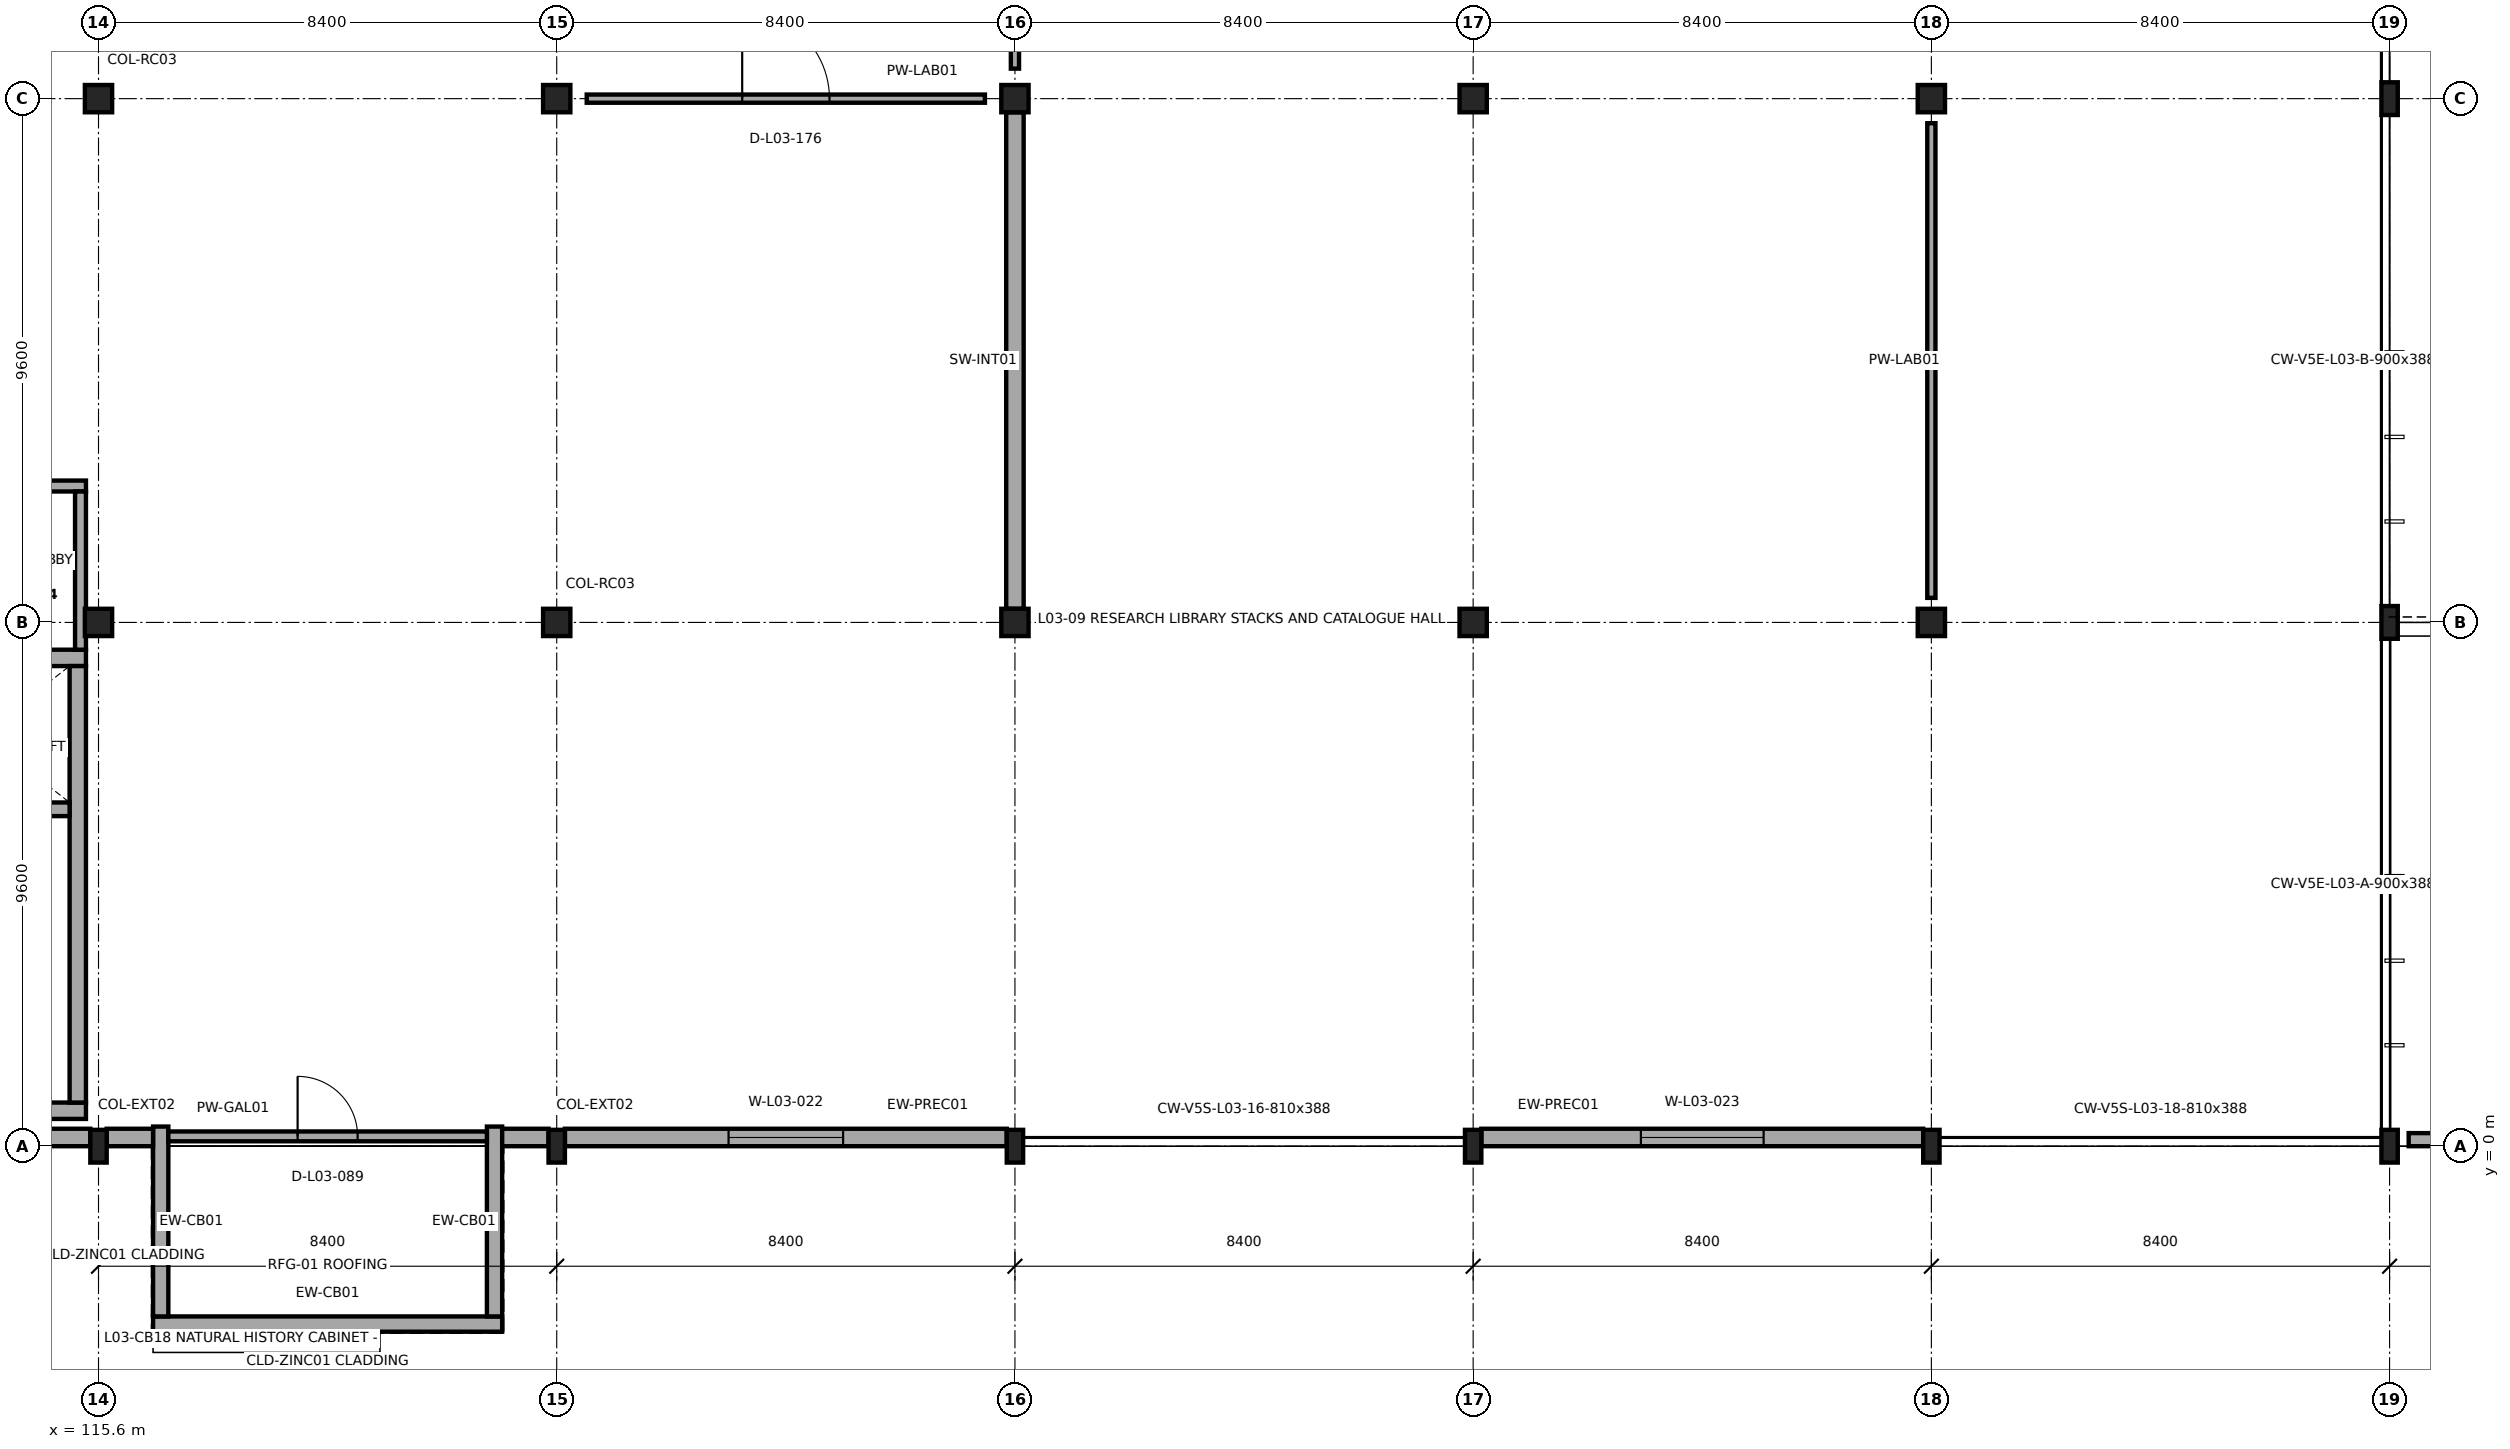
"""IFC4 building model, lengths in metres.
Left out: names, types, materials, properties, quantities, classifications, styles, units other than length and angle.
Written with IfcOpenShell. Run it as: python <this file> out.ifc"""

import sys

from ifc_helpers import new_model, si_unit, direction, frame, frame_2d, origin, origin_2d, place, context, subcontext, project, spatial, rectangle, i_section, extrude, element, fill, save


model = new_model("IFC4")
c1 = context("Model", 3, precision=1e-05, world=origin(), true_north=direction((0.0, 1.0)))
c2 = subcontext(c1, "Body", "Model", "MODEL_VIEW")
j1 = project(units=[si_unit("LENGTHUNIT", "METRE"), si_unit("PLANEANGLEUNIT", "RADIAN")], contexts=[c1])
p1 = place(None, origin())
s1 = spatial("IfcSite", under=j1, at=p1, CompositionType="ELEMENT")
p2 = place(p1, origin())
s2 = spatial("IfcBuilding", under=s1, at=p2, CompositionType="ELEMENT")
p3 = place(p2, frame((0.0, 0.0, 17.4)))
s3 = spatial("IfcBuildingStorey", under=s2, at=p3, CompositionType="ELEMENT", Elevation=17.4)
p4 = place(p3, frame((115.6, 0.0, 0.0), z_axis=(0.0, 0.0, 1.0), x_axis=(1.0, 0.0, 0.0)))
e1 = element("IfcColumn", 1, at=p4, inside=s3, PredefinedType="COLUMN", context=c2, shape_type="SweptSolid", body=[
    extrude(i_section(OverallWidth=0.3, OverallDepth=0.6, WebThickness=0.015, FlangeThickness=0.03, FilletRadius=0.027, at=origin_2d()), origin(), (0.0, 0.0, 1.0), 4.5),
])
for number, where, z_axis, x_axis in (
    (2, (115.6, 9.6, 0.0), (0.0, 0.0, 1.0), (1.0, 0.0, 0.0)),
    (3, (115.6, 19.2, 0.0), (0.0, 0.0, 1.0), (1.0, 0.0, 0.0)),
):
    element("IfcColumn", number, at=place(p3, frame(where, z_axis=z_axis, x_axis=x_axis)), inside=s3, PredefinedType="COLUMN", context=c2, shape_type="SweptSolid", body=[
        extrude(rectangle(XDim=0.5, YDim=0.5, at=origin_2d()), origin(), (0.0, 0.0, 1.0), 4.5),
    ])
p5 = place(p3, frame((124.0, 0.0, 0.0), z_axis=(0.0, 0.0, 1.0), x_axis=(1.0, 0.0, 0.0)))
e4 = element("IfcColumn", 4, at=p5, inside=s3, PredefinedType="COLUMN", context=c2, shape_type="SweptSolid", body=[
    extrude(i_section(OverallWidth=0.3, OverallDepth=0.6, WebThickness=0.015, FlangeThickness=0.03, FilletRadius=0.027, at=origin_2d()), origin(), (0.0, 0.0, 1.0), 4.5),
])
for number, where, z_axis, x_axis in (
    (5, (124.0, 9.6, 0.0), (0.0, 0.0, 1.0), (1.0, 0.0, 0.0)),
    (6, (124.0, 19.2, 0.0), (0.0, 0.0, 1.0), (1.0, 0.0, 0.0)),
):
    element("IfcColumn", number, at=place(p3, frame(where, z_axis=z_axis, x_axis=x_axis)), inside=s3, PredefinedType="COLUMN", context=c2, shape_type="SweptSolid", body=[
        extrude(rectangle(XDim=0.5, YDim=0.5, at=origin_2d()), origin(), (0.0, 0.0, 1.0), 4.5),
    ])
p6 = place(p3, frame((132.4, 0.0, 0.0), z_axis=(0.0, 0.0, 1.0), x_axis=(1.0, 0.0, 0.0)))
e7 = element("IfcColumn", 7, at=p6, inside=s3, PredefinedType="COLUMN", context=c2, shape_type="SweptSolid", body=[
    extrude(i_section(OverallWidth=0.3, OverallDepth=0.6, WebThickness=0.015, FlangeThickness=0.03, FilletRadius=0.027, at=origin_2d()), origin(), (0.0, 0.0, 1.0), 4.5),
])
for number, where, z_axis, x_axis in (
    (8, (132.4, 9.6, 0.0), (0.0, 0.0, 1.0), (1.0, 0.0, 0.0)),
    (9, (132.4, 19.2, 0.0), (0.0, 0.0, 1.0), (1.0, 0.0, 0.0)),
):
    element("IfcColumn", number, at=place(p3, frame(where, z_axis=z_axis, x_axis=x_axis)), inside=s3, PredefinedType="COLUMN", context=c2, shape_type="SweptSolid", body=[
        extrude(rectangle(XDim=0.5, YDim=0.5, at=origin_2d()), origin(), (0.0, 0.0, 1.0), 4.5),
    ])
p7 = place(p3, frame((140.8, 0.0, 0.0), z_axis=(0.0, 0.0, 1.0), x_axis=(1.0, 0.0, 0.0)))
e10 = element("IfcColumn", 10, at=p7, inside=s3, PredefinedType="COLUMN", context=c2, shape_type="SweptSolid", body=[
    extrude(i_section(OverallWidth=0.3, OverallDepth=0.6, WebThickness=0.015, FlangeThickness=0.03, FilletRadius=0.027, at=origin_2d()), origin(), (0.0, 0.0, 1.0), 4.5),
])
for number, where, z_axis, x_axis in (
    (11, (140.8, 9.6, 0.0), (0.0, 0.0, 1.0), (1.0, 0.0, 0.0)),
    (12, (140.8, 19.2, 0.0), (0.0, 0.0, 1.0), (1.0, 0.0, 0.0)),
):
    element("IfcColumn", number, at=place(p3, frame(where, z_axis=z_axis, x_axis=x_axis)), inside=s3, PredefinedType="COLUMN", context=c2, shape_type="SweptSolid", body=[
        extrude(rectangle(XDim=0.5, YDim=0.5, at=origin_2d()), origin(), (0.0, 0.0, 1.0), 4.5),
    ])
p8 = place(p3, frame((149.2, 0.0, 0.0), z_axis=(0.0, 0.0, 1.0), x_axis=(1.0, 0.0, 0.0)))
e13 = element("IfcColumn", 13, at=p8, inside=s3, PredefinedType="COLUMN", context=c2, shape_type="SweptSolid", body=[
    extrude(i_section(OverallWidth=0.3, OverallDepth=0.6, WebThickness=0.015, FlangeThickness=0.03, FilletRadius=0.027, at=origin_2d()), origin(), (0.0, 0.0, 1.0), 4.5),
])
for number, where, z_axis, x_axis in (
    (14, (149.2, 9.6, 0.0), (0.0, 0.0, 1.0), (1.0, 0.0, 0.0)),
    (15, (149.2, 19.2, 0.0), (0.0, 0.0, 1.0), (1.0, 0.0, 0.0)),
):
    element("IfcColumn", number, at=place(p3, frame(where, z_axis=z_axis, x_axis=x_axis)), inside=s3, PredefinedType="COLUMN", context=c2, shape_type="SweptSolid", body=[
        extrude(rectangle(XDim=0.5, YDim=0.5, at=origin_2d()), origin(), (0.0, 0.0, 1.0), 4.5),
    ])
for number, where, z_axis, x_axis in (
    (16, (157.6, 0.0, 0.0), (0.0, 0.0, 1.0), (1.0, 0.0, 0.0)),
    (17, (157.6, 9.6, 0.0), (0.0, 0.0, 1.0), (1.0, 0.0, 0.0)),
    (18, (157.6, 19.2, 0.0), (0.0, 0.0, 1.0), (1.0, 0.0, 0.0)),
):
    element("IfcColumn", number, at=place(p3, frame(where, z_axis=z_axis, x_axis=x_axis)), inside=s3, PredefinedType="COLUMN", context=c2, shape_type="SweptSolid", body=[
        extrude(i_section(OverallWidth=0.3, OverallDepth=0.6, WebThickness=0.015, FlangeThickness=0.03, FilletRadius=0.027, at=origin_2d()), origin(), (0.0, 0.0, 1.0), 4.5),
    ])
p9 = place(p3, frame((116.6, -3.26, 0.0), z_axis=(0.0, 0.0, 1.0), x_axis=(1.0, 0.0, 0.0)))
e19 = element("IfcWall", 19, at=p9, inside=s3, PredefinedType="SOLIDWALL", context=c2, shape_type="SweptSolid", body=[
    extrude(rectangle(XDim=6.4, YDim=0.28, at=frame_2d((3.2, 0.0))), origin(), (0.0, 0.0, 1.0), 2.99),
])
for number, where, z_axis, x_axis in (
    (20, (116.74, 0.36, 0.0), (0.0, 0.0, 1.0), (0.0, -1.0, 0.0)),
    (21, (122.86, -3.12, 0.0), (0.0, 0.0, 1.0), (0.0, 1.0, 0.0)),
):
    element("IfcWall", number, at=place(p3, frame(where, z_axis=z_axis, x_axis=x_axis)), inside=s3, PredefinedType="SOLIDWALL", context=c2, shape_type="SweptSolid", body=[
        extrude(rectangle(XDim=3.48, YDim=0.28, at=frame_2d((1.74, 0.0))), origin(), (0.0, 0.0, 1.0), 2.99),
    ])
p10 = place(p3, frame((107.625, 0.16, 0.0), z_axis=(0.0, 0.0, 1.0), x_axis=(1.0, 0.0, 0.0)))
e22 = element("IfcWall", 22, at=p10, inside=s3, PredefinedType="SOLIDWALL", context=c2, shape_type="SweptSolid", body=[
    extrude(rectangle(XDim=7.825, YDim=0.32, at=frame_2d((3.913, 0.0))), origin(), (0.0, 0.0, 1.0), 3.02),
])
for number, where, z_axis, x_axis in (
    (23, (115.75, 0.16, 0.0), (0.0, 0.0, 1.0), (1.0, 0.0, 0.0)),
    (24, (123.0, 0.16, 0.0), (0.0, 0.0, 1.0), (1.0, 0.0, 0.0)),
):
    element("IfcWall", number, at=place(p3, frame(where, z_axis=z_axis, x_axis=x_axis)), inside=s3, PredefinedType="SOLIDWALL", context=c2, shape_type="SweptSolid", body=[
        extrude(rectangle(XDim=0.85, YDim=0.32, at=frame_2d((0.425, 0.0))), origin(), (0.0, 0.0, 1.0), 3.88),
    ])
p11 = place(p3, frame((124.15, 0.16, 0.0), z_axis=(0.0, 0.0, 1.0), x_axis=(1.0, 0.0, 0.0)))
e25 = element("IfcWall", 25, at=p11, inside=s3, PredefinedType="SOLIDWALL", context=c2, shape_type="SweptSolid", body=[
    extrude(rectangle(XDim=8.1, YDim=0.32, at=frame_2d((4.05, 0.0))), origin(), (0.0, 0.0, 1.0), 3.88),
])
p12 = place(p11, frame((3.0, 0.0, 1.0)))
e26 = element("IfcOpeningElement", 26, at=p12, cuts=e25, PredefinedType="OPENING", context=c2, shape_type="SweptSolid", body=[
    extrude(rectangle(XDim=2.1, YDim=1.8, at=frame_2d((1.05, 0.9))), frame((0.0, 0.17, 0.0), z_axis=(0.0, -1.0, 0.0), x_axis=(1.0, 0.0, 0.0)), (0.0, 0.0, 1.0), 0.34),
])
p13 = place(p3, frame((140.95, 0.16, 0.0), z_axis=(0.0, 0.0, 1.0), x_axis=(1.0, 0.0, 0.0)))
e27 = element("IfcWall", 27, at=p13, inside=s3, PredefinedType="SOLIDWALL", context=c2, shape_type="SweptSolid", body=[
    extrude(rectangle(XDim=8.1, YDim=0.32, at=frame_2d((4.05, 0.0))), origin(), (0.0, 0.0, 1.0), 3.88),
])
p14 = place(p13, frame((2.925, 0.0, 1.0)))
e28 = element("IfcOpeningElement", 28, at=p14, cuts=e27, PredefinedType="OPENING", context=c2, shape_type="SweptSolid", body=[
    extrude(rectangle(XDim=2.25, YDim=2.35, at=frame_2d((1.125, 1.175))), frame((0.0, 0.17, 0.0), z_axis=(0.0, -1.0, 0.0), x_axis=(1.0, 0.0, 0.0)), (0.0, 0.0, 1.0), 0.34),
])
p15 = place(p3, frame((157.95, 0.12, 0.0), z_axis=(0.0, 0.0, 1.0), x_axis=(1.0, 0.0, 0.0)))
e29 = element("IfcWall", 29, at=p15, inside=s3, PredefinedType="PARAPET", context=c2, shape_type="SweptSolid", body=[
    extrude(rectangle(XDim=6.73, YDim=0.24, at=frame_2d((3.365, 0.0))), origin(), (0.0, 0.0, 1.0), 0.95),
])
p16 = place(p3, frame((107.43, 0.65, 0.0), z_axis=(0.0, 0.0, 1.0), x_axis=(1.0, 0.0, 0.0)))
e30 = element("IfcWall", 30, at=p16, inside=s3, PredefinedType="SHEAR", context=c2, shape_type="SweptSolid", body=[
    extrude(rectangle(XDim=7.94, YDim=0.3, at=frame_2d((3.97, 0.0))), origin(), (0.0, 0.0, 1.0), 4.25),
])
p17 = place(p3, frame((115.37, 8.95, 0.0), z_axis=(0.0, 0.0, 1.0), x_axis=(-1.0, 0.0, 0.0)))
e31 = element("IfcWall", 31, at=p17, inside=s3, PredefinedType="SHEAR", context=c2, shape_type="SweptSolid", body=[
    extrude(rectangle(XDim=7.94, YDim=0.3, at=frame_2d((3.97, 0.0))), origin(), (0.0, 0.0, 1.0), 4.25),
])
p18 = place(p17, frame((5.17, 0.0, 0.0)))
e32 = element("IfcOpeningElement", 32, at=p18, cuts=e31, PredefinedType="OPENING", context=c2, shape_type="SweptSolid", body=[
    extrude(rectangle(XDim=1.1, YDim=2.2, at=frame_2d((0.55, 1.1))), frame((0.0, 0.16, 0.0), z_axis=(0.0, -1.0, 0.0), x_axis=(1.0, 0.0, 0.0)), (0.0, 0.0, 1.0), 0.32),
])
p19 = place(p17, frame((1.35, 0.0, 0.0)))
e33 = element("IfcOpeningElement", 33, at=p19, cuts=e31, PredefinedType="OPENING", context=c2, shape_type="SweptSolid", body=[
    extrude(rectangle(XDim=1.1, YDim=2.1, at=frame_2d((0.55, 1.05))), frame((0.0, 0.16, 0.0), z_axis=(0.0, -1.0, 0.0), x_axis=(1.0, 0.0, 0.0)), (0.0, 0.0, 1.0), 0.32),
])
p20 = place(p3, frame((115.22, 0.8, 0.0), z_axis=(0.0, 0.0, 1.0), x_axis=(0.0, 1.0, 0.0)))
e34 = element("IfcWall", 34, at=p20, inside=s3, PredefinedType="SHEAR", context=c2, shape_type="SweptSolid", body=[
    extrude(rectangle(XDim=8.0, YDim=0.3, at=frame_2d((4.0, 0.0))), origin(), (0.0, 0.0, 1.0), 4.25),
])
p21 = place(p3, frame((111.87, 6.175, 0.0), z_axis=(0.0, 0.0, 1.0), x_axis=(1.0, 0.0, 0.0)))
e35 = element("IfcWall", 35, at=p21, inside=s3, PredefinedType="SHEAR", context=c2, shape_type="SweptSolid", body=[
    extrude(rectangle(XDim=3.2, YDim=0.25, at=frame_2d((1.6, 0.0))), origin(), (0.0, 0.0, 1.0), 4.25),
])
p22 = place(p3, frame((107.43, 12.1, 0.0), z_axis=(0.0, 0.0, 1.0), x_axis=(1.0, 0.0, 0.0)))
e36 = element("IfcWall", 36, at=p22, inside=s3, PredefinedType="SOLIDWALL", context=c2, shape_type="SweptSolid", body=[
    extrude(rectangle(XDim=7.94, YDim=0.2, at=frame_2d((3.97, 0.0))), origin(), (0.0, 0.0, 1.0), 3.682),
])
p23 = place(p22, frame((3.07, 0.0, 0.0)))
e37 = element("IfcOpeningElement", 37, at=p23, cuts=e36, PredefinedType="OPENING", context=c2, shape_type="SweptSolid", body=[
    extrude(rectangle(XDim=1.8, YDim=2.2, at=frame_2d((0.9, 1.1))), frame((0.0, 0.11, 0.0), z_axis=(0.0, -1.0, 0.0), x_axis=(1.0, 0.0, 0.0)), (0.0, 0.0, 1.0), 0.22),
])
p24 = place(p3, frame((115.27, 12.0, 0.0), z_axis=(0.0, 0.0, 1.0), x_axis=(0.0, -1.0, 0.0)))
e38 = element("IfcWall", 38, at=p24, inside=s3, PredefinedType="SOLIDWALL", context=c2, shape_type="SweptSolid", body=[
    extrude(rectangle(XDim=2.9, YDim=0.2, at=frame_2d((1.45, 0.0))), origin(), (0.0, 0.0, 1.0), 3.782),
])
p25 = place(p3, frame((132.4, 9.85, 0.0), z_axis=(0.0, 0.0, 1.0), x_axis=(0.0, 1.0, 0.0)))
e39 = element("IfcWall", 39, at=p25, inside=s3, PredefinedType="SHEAR", context=c2, shape_type="SweptSolid", body=[
    extrude(rectangle(XDim=9.1, YDim=0.32, at=frame_2d((4.55, 0.0))), origin(), (0.0, 0.0, 1.0), 4.25),
])
p26 = place(p3, frame((116.88, 0.18, 0.0), z_axis=(0.0, 0.0, 1.0), x_axis=(1.0, 0.0, 0.0)))
e40 = element("IfcWall", 40, at=p26, inside=s3, PredefinedType="PARTITIONING", context=c2, shape_type="SweptSolid", body=[
    extrude(rectangle(XDim=5.84, YDim=0.18, at=frame_2d((2.92, 0.0))), origin(), (0.0, 0.0, 1.0), 2.99),
])
p27 = place(p26, frame((2.37, 0.0, 0.0)))
e41 = element("IfcOpeningElement", 41, at=p27, cuts=e40, PredefinedType="OPENING", context=c2, shape_type="SweptSolid", body=[
    extrude(rectangle(XDim=1.1, YDim=2.2, at=frame_2d((0.55, 1.1))), frame((0.0, 0.1, 0.0), z_axis=(0.0, -1.0, 0.0), x_axis=(1.0, 0.0, 0.0)), (0.0, 0.0, 1.0), 0.2),
])
p28 = place(p3, frame((149.2, 10.05, 0.0), z_axis=(0.0, 0.0, 1.0), x_axis=(0.0, 1.0, 0.0)))
e42 = element("IfcWall", 42, at=p28, inside=s3, PredefinedType="PARTITIONING", context=c2, shape_type="SweptSolid", body=[
    extrude(rectangle(XDim=8.7, YDim=0.15, at=frame_2d((4.35, 0.0))), origin(), (0.0, 0.0, 1.0), 3.632),
])
p29 = place(p3, frame((124.55, 19.2, 0.0), z_axis=(0.0, 0.0, 1.0), x_axis=(1.0, 0.0, 0.0)))
e43 = element("IfcWall", 43, at=p29, inside=s3, PredefinedType="PARTITIONING", context=c2, shape_type="SweptSolid", body=[
    extrude(rectangle(XDim=7.3, YDim=0.15, at=frame_2d((3.65, 0.0))), origin(), (0.0, 0.0, 1.0), 3.782),
])
p30 = place(p29, frame((2.85, 0.0, 0.0)))
e44 = element("IfcOpeningElement", 44, at=p30, cuts=e43, PredefinedType="OPENING", context=c2, shape_type="SweptSolid", body=[
    extrude(rectangle(XDim=1.6, YDim=2.4, at=frame_2d((0.8, 1.2))), frame((0.0, 0.085, 0.0), z_axis=(0.0, -1.0, 0.0), x_axis=(1.0, 0.0, 0.0)), (0.0, 0.0, 1.0), 0.17),
])
p31 = place(p3, frame((132.4, 19.75, 0.0), z_axis=(0.0, 0.0, 1.0), x_axis=(0.0, 1.0, 0.0)))
e45 = element("IfcWall", 45, at=p31, inside=s3, PredefinedType="PARTITIONING", context=c2, shape_type="SweptSolid", body=[
    extrude(rectangle(XDim=6.1, YDim=0.15, at=frame_2d((3.05, 0.0))), origin(), (0.0, 0.0, 1.0), 3.682),
])
p32 = place(p31, frame((2.2, 0.0, 0.0)))
e46 = element("IfcOpeningElement", 46, at=p32, cuts=e45, PredefinedType="OPENING", context=c2, shape_type="SweptSolid", body=[
    extrude(rectangle(XDim=1.7, YDim=2.35, at=frame_2d((0.85, 1.175))), frame((0.0, 0.085, 0.0), z_axis=(0.0, -1.0, 0.0), x_axis=(1.0, 0.0, 0.0)), (0.0, 0.0, 1.0), 0.17),
])
p33 = place(p12, origin())
e47 = element("IfcWindow", 47, at=p33, inside=s3, PartitioningType="SINGLE_PANEL", PredefinedType="WINDOW", context=c2, shape_type="SweptSolid", body=[
    extrude(rectangle(XDim=2.1, YDim=1.8, at=frame_2d((1.05, 0.9))), frame((0.0, 0.03, 0.0), z_axis=(0.0, -1.0, 0.0), x_axis=(1.0, 0.0, 0.0)), (0.0, 0.0, 1.0), 0.06),
])
fill(e26, e47)
p34 = place(p14, origin())
e48 = element("IfcWindow", 48, at=p34, inside=s3, PartitioningType="SINGLE_PANEL", PredefinedType="WINDOW", context=c2, shape_type="SweptSolid", body=[
    extrude(rectangle(XDim=2.25, YDim=2.35, at=frame_2d((1.125, 1.175))), frame((0.0, 0.03, 0.0), z_axis=(0.0, -1.0, 0.0), x_axis=(1.0, 0.0, 0.0)), (0.0, 0.0, 1.0), 0.06),
])
fill(e28, e48)
p35 = place(p27, origin())
e49 = element("IfcDoor", 49, at=p35, inside=s3, OperationType="SINGLE_SWING_LEFT", PredefinedType="DOOR", context=c2, shape_type="SweptSolid", body=[
    extrude(rectangle(XDim=1.1, YDim=2.2, at=frame_2d((0.55, 1.1))), frame((0.0, 0.025, 0.0), z_axis=(0.0, -1.0, 0.0), x_axis=(1.0, 0.0, 0.0)), (0.0, 0.0, 1.0), 0.05),
])
fill(e41, e49)
p36 = place(p30, origin())
e50 = element("IfcDoor", 50, at=p36, inside=s3, OperationType="DOUBLE_DOOR_SINGLE_SWING", PredefinedType="DOOR", context=c2, shape_type="SweptSolid", body=[
    extrude(rectangle(XDim=1.6, YDim=2.4, at=frame_2d((0.8, 1.2))), frame((0.0, 0.025, 0.0), z_axis=(0.0, -1.0, 0.0), x_axis=(1.0, 0.0, 0.0)), (0.0, 0.0, 1.0), 0.05),
])
fill(e44, e50)
save(model, sys.argv[1])
